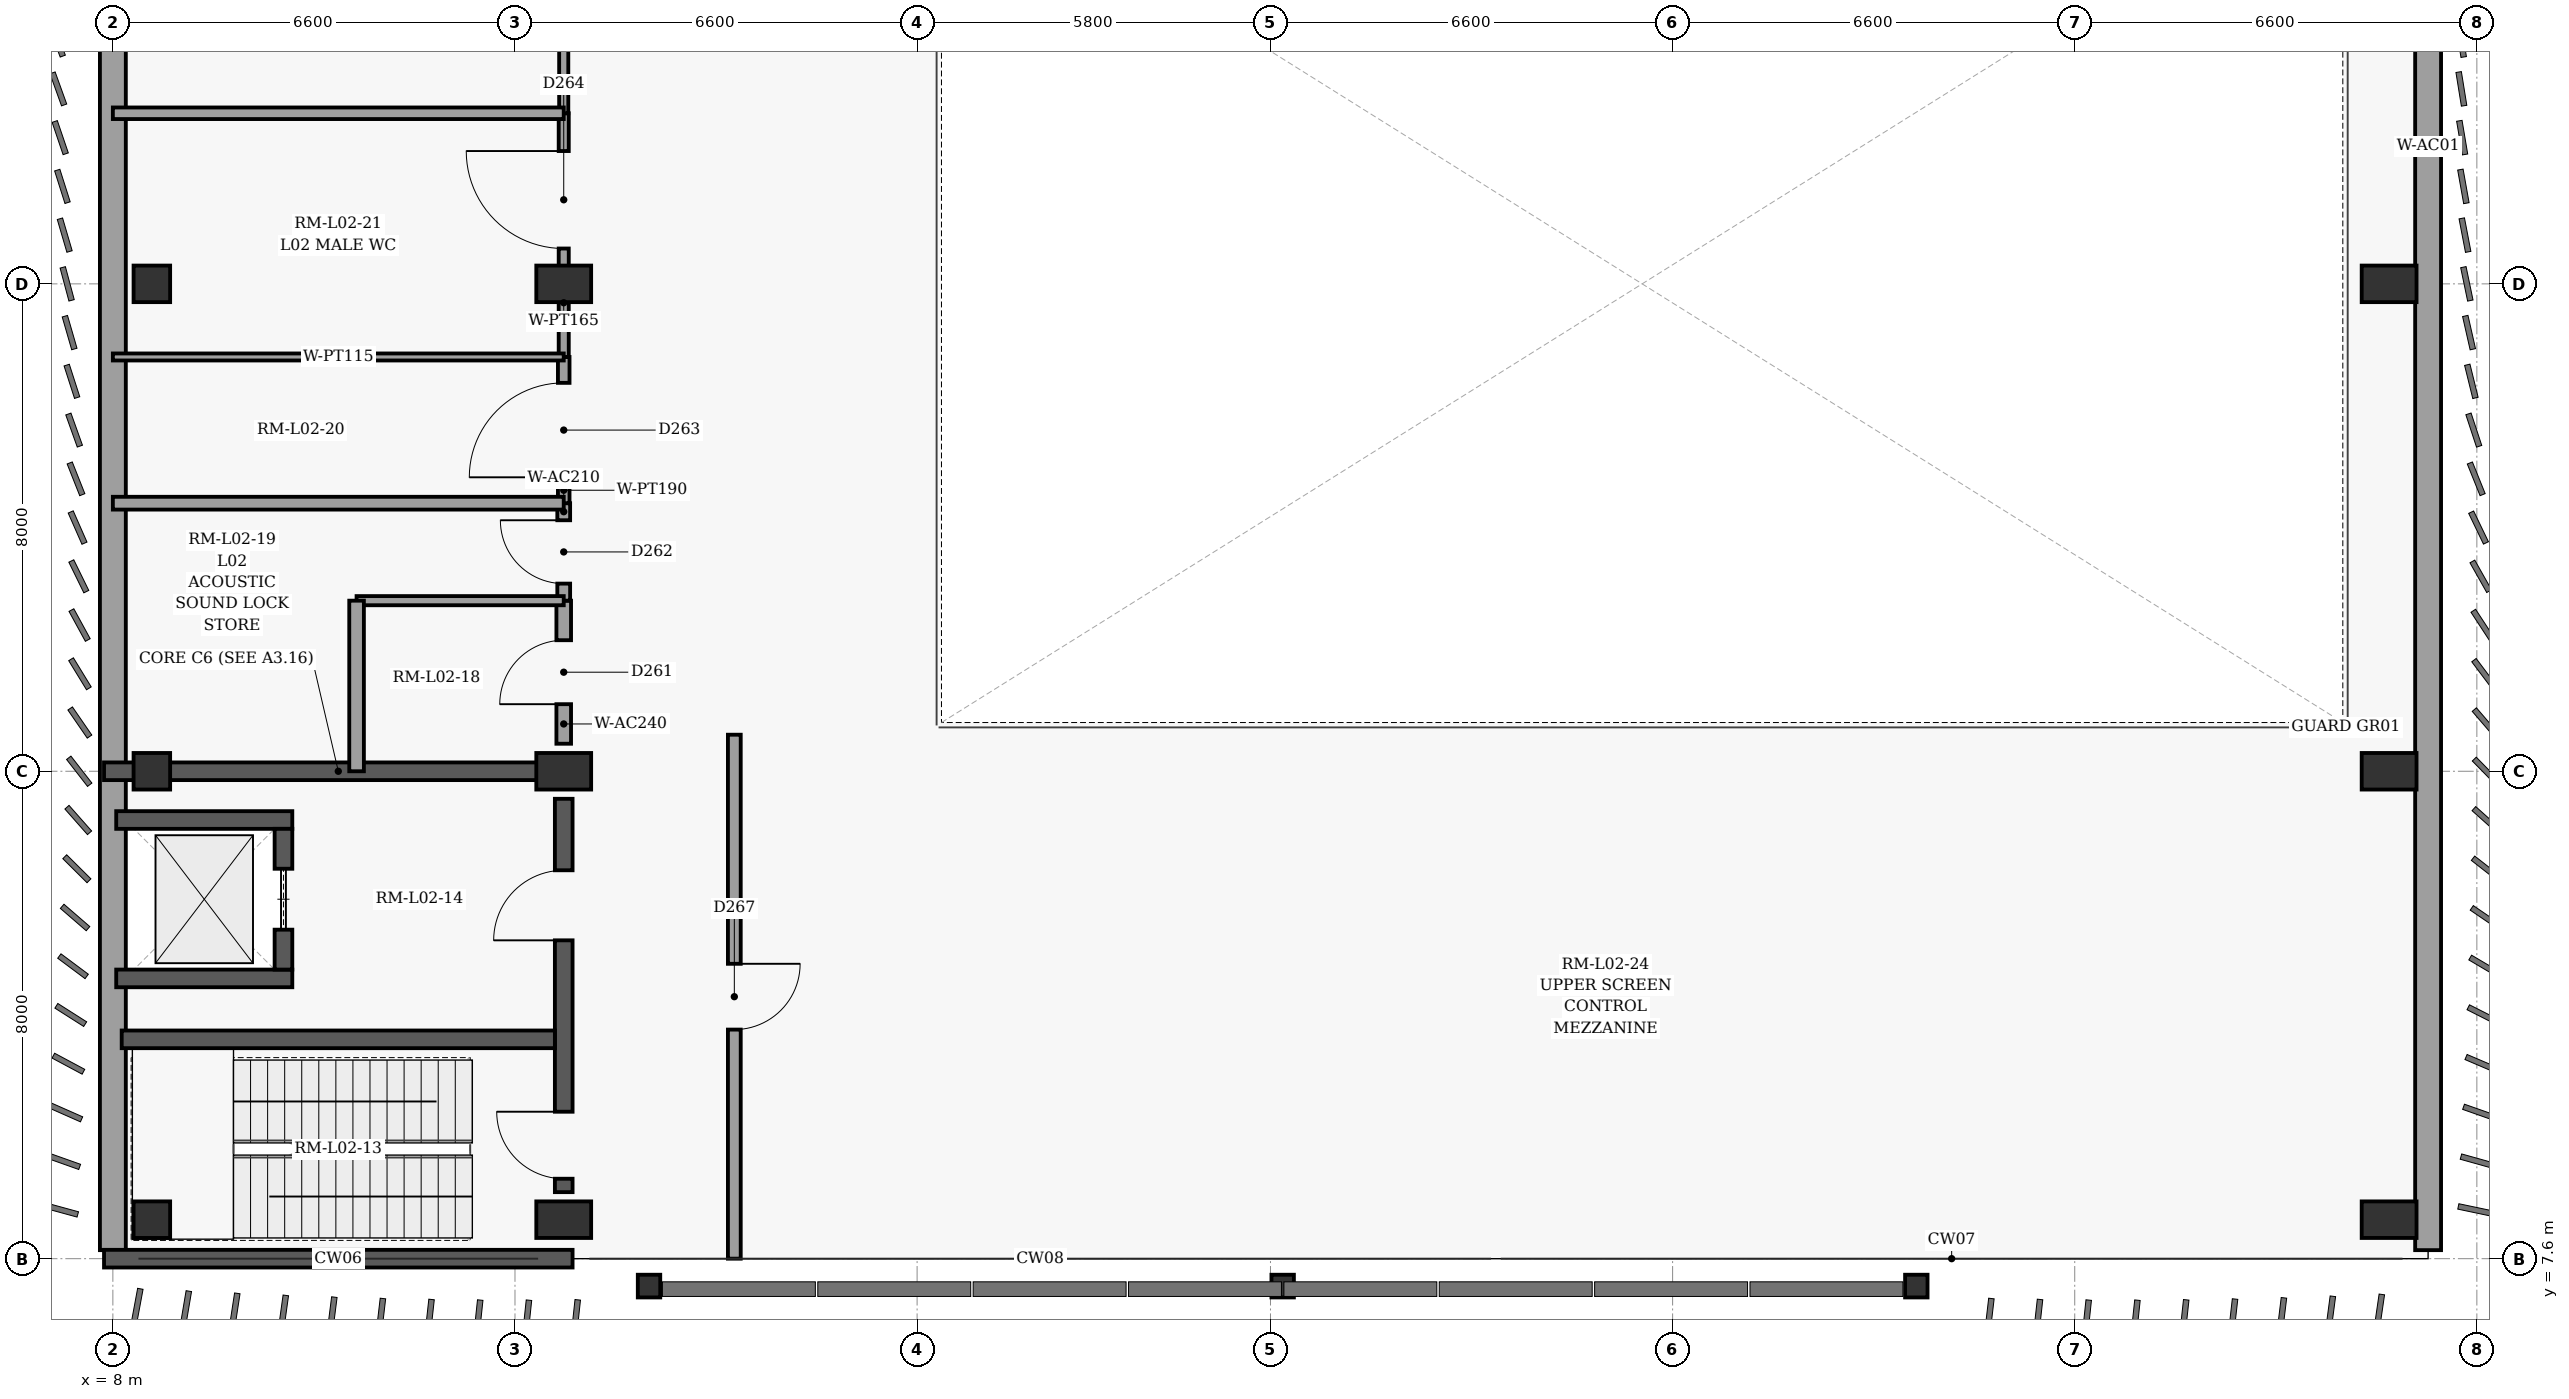
"""IFC4 building model, lengths in metres.
Left out: names, types, materials, properties, quantities, classifications, styles, units other than length and angle.
Written with IfcOpenShell. Run it as: python <this file> out.ifc"""

import sys

from ifc_helpers import new_model, si_unit, direction, frame, frame_2d, origin, origin_2d, place, context, subcontext, project, spatial, rectangle, i_section, extrude, element, fill, save


model = new_model("IFC4")
c1 = context("Model", 3, precision=1e-05, world=origin(), true_north=direction((0.0, 1.0)))
c2 = subcontext(c1, "Body", "Model", "MODEL_VIEW")
j1 = project(units=[si_unit("LENGTHUNIT", "METRE"), si_unit("PLANEANGLEUNIT", "RADIAN")], contexts=[c1])
p1 = place(None, origin())
s1 = spatial("IfcSite", under=j1, at=p1, CompositionType="ELEMENT")
p2 = place(p1, origin())
s2 = spatial("IfcBuilding", under=s1, at=p2, CompositionType="ELEMENT")
p3 = place(p2, frame((0.0, 0.0, 10.2)))
s3 = spatial("IfcBuildingStorey", under=s2, at=p3, CompositionType="ELEMENT", Elevation=10.2)
for number, where, z_axis, x_axis in (
    (1, (8.64, 8.24, 0.0), (0.0, 0.0, 1.0), (1.0, 0.0, 0.0)),
    (2, (8.64, 15.6, 0.0), (0.0, 0.0, 1.0), (1.0, 0.0, 0.0)),
    (3, (8.64, 23.6, 0.0), (0.0, 0.0, 1.0), (1.0, 0.0, 0.0)),
):
    element("IfcColumn", number, at=place(p3, frame(where, z_axis=z_axis, x_axis=x_axis)), inside=s3, PredefinedType="COLUMN", context=c2, shape_type="SweptSolid", body=[
        extrude(rectangle(XDim=0.6, YDim=0.6, at=origin_2d()), origin(), (0.0, 0.0, 1.0), 5.4),
    ])
for number, where, z_axis, x_axis in (
    (4, (15.4, 8.24, 0.0), (0.0, 0.0, 1.0), (1.0, 0.0, 0.0)),
    (5, (15.4, 15.6, 0.0), (0.0, 0.0, 1.0), (1.0, 0.0, 0.0)),
    (6, (15.4, 23.6, 0.0), (0.0, 0.0, 1.0), (1.0, 0.0, 0.0)),
    (7, (45.36, 8.24, 0.0), (0.0, 0.0, 1.0), (1.0, 0.0, 0.0)),
    (8, (45.36, 15.6, 0.0), (0.0, 0.0, 1.0), (1.0, 0.0, 0.0)),
    (9, (45.36, 23.6, 0.0), (0.0, 0.0, 1.0), (1.0, 0.0, 0.0)),
):
    element("IfcColumn", number, at=place(p3, frame(where, z_axis=z_axis, x_axis=x_axis)), inside=s3, PredefinedType="COLUMN", context=c2, shape_type="SweptSolid", body=[
        extrude(rectangle(XDim=0.6, YDim=0.9, at=origin_2d()), origin(), (0.0, 0.0, 1.0), 5.4),
    ])
for number, where, z_axis, x_axis in (
    (10, (16.8, 7.15, 0.0), (0.0, 0.0, 1.0), (1.0, 0.0, 0.0)),
    (11, (27.2, 7.15, 0.0), (0.0, 0.0, 1.0), (1.0, 0.0, 0.0)),
    (12, (37.6, 7.15, 0.0), (0.0, 0.0, 1.0), (1.0, 0.0, 0.0)),
):
    element("IfcColumn", number, at=place(p3, frame(where, z_axis=z_axis, x_axis=x_axis)), inside=s3, PredefinedType="COLUMN", context=c2, shape_type="SweptSolid", body=[
        extrude(i_section(OverallWidth=0.373, OverallDepth=0.368, WebThickness=0.014, FlangeThickness=0.024, at=origin_2d()), origin(), (0.0, 0.0, 1.0), 5.4),
    ])
for number, where, z_axis, x_axis in (
    (13, (46.0, 63.46, 0.0), (0.0, 0.0, 1.0), (0.0, -1.0, 0.0)),
    (14, (8.0, 7.74, 0.0), (0.0, 0.0, 1.0), (0.0, 1.0, 0.0)),
):
    element("IfcWall", number, at=place(p3, frame(where, z_axis=z_axis, x_axis=x_axis)), inside=s3, PredefinedType="SOLIDWALL", context=c2, shape_type="SweptSolid", body=[
        extrude(rectangle(XDim=55.72, YDim=0.425, at=frame_2d((27.86, 0.0))), origin(), (0.0, 0.0, 1.0), 5.16),
    ])
p4 = place(p3, frame((7.855, 7.6, 0.0), z_axis=(0.0, 0.0, 1.0), x_axis=(1.0, 0.0, 0.0)))
e15 = element("IfcWall", 15, at=p4, inside=s3, PredefinedType="SHEAR", context=c2, shape_type="SweptSolid", body=[
    extrude(rectangle(XDim=7.69, YDim=0.29, at=frame_2d((3.845, 0.0))), origin(), (0.0, 0.0, 1.0), 5.16),
])
p5 = place(p3, frame((7.855, 15.6, 0.0), z_axis=(0.0, 0.0, 1.0), x_axis=(1.0, 0.0, 0.0)))
e16 = element("IfcWall", 16, at=p5, inside=s3, PredefinedType="SHEAR", context=c2, shape_type="SweptSolid", body=[
    extrude(rectangle(XDim=7.243, YDim=0.29, at=frame_2d((3.622, 0.0))), origin(), (0.0, 0.0, 1.0), 5.16),
])
p6 = place(p3, frame((15.4, 8.692, 0.0), z_axis=(0.0, 0.0, 1.0), x_axis=(0.0, 1.0, 0.0)))
e17 = element("IfcWall", 17, at=p6, inside=s3, PredefinedType="SHEAR", context=c2, shape_type="SweptSolid", body=[
    extrude(rectangle(XDim=6.456, YDim=0.29, at=frame_2d((3.228, 0.0))), origin(), (0.0, 0.0, 1.0), 5.16),
])
p7 = place(p6, frame((0.22, 0.0, 0.0)))
e18 = element("IfcOpeningElement", 18, at=p7, cuts=e17, PredefinedType="OPENING", context=c2, shape_type="SweptSolid", body=[
    extrude(rectangle(XDim=1.1, YDim=2.15, at=frame_2d((0.55, 1.075))), frame((0.0, 0.155, 0.0), z_axis=(0.0, -1.0, 0.0), x_axis=(1.0, 0.0, 0.0)), (0.0, 0.0, 1.0), 0.31),
])
p8 = place(p6, frame((4.133, 0.0, 0.0)))
e19 = element("IfcOpeningElement", 19, at=p8, cuts=e17, PredefinedType="OPENING", context=c2, shape_type="SweptSolid", body=[
    extrude(rectangle(XDim=1.15, YDim=2.2, at=frame_2d((0.575, 1.1))), frame((0.0, 0.155, 0.0), z_axis=(0.0, -1.0, 0.0), x_axis=(1.0, 0.0, 0.0)), (0.0, 0.0, 1.0), 0.31),
])
p9 = place(p3, frame((8.145, 11.2, 0.0), z_axis=(0.0, 0.0, 1.0), x_axis=(1.0, 0.0, 0.0)))
e20 = element("IfcWall", 20, at=p9, inside=s3, PredefinedType="SHEAR", context=c2, shape_type="SweptSolid", body=[
    extrude(rectangle(XDim=7.11, YDim=0.29, at=frame_2d((3.555, 0.0))), origin(), (0.0, 0.0, 1.0), 5.16),
])
for number, where, z_axis, x_axis in (
    (21, (8.055, 12.2, 0.0), (0.0, 0.0, 1.0), (1.0, 0.0, 0.0)),
    (22, (8.055, 14.8, 0.0), (0.0, 0.0, 1.0), (1.0, 0.0, 0.0)),
):
    element("IfcWall", number, at=place(p3, frame(where, z_axis=z_axis, x_axis=x_axis)), inside=s3, PredefinedType="SHEAR", context=c2, shape_type="SweptSolid", body=[
        extrude(rectangle(XDim=2.89, YDim=0.29, at=frame_2d((1.445, 0.0))), origin(), (0.0, 0.0, 1.0), 5.16),
    ])
p10 = place(p3, frame((10.8, 12.345, 0.0), z_axis=(0.0, 0.0, 1.0), x_axis=(0.0, 1.0, 0.0)))
e23 = element("IfcWall", 23, at=p10, inside=s3, PredefinedType="SHEAR", context=c2, shape_type="SweptSolid", body=[
    extrude(rectangle(XDim=2.31, YDim=0.29, at=frame_2d((1.155, 0.0))), origin(), (0.0, 0.0, 1.0), 5.16),
])
p11 = place(p10, frame((0.655, 0.0, 0.0)))
e24 = element("IfcOpeningElement", 24, at=p11, cuts=e23, PredefinedType="OPENING", context=c2, shape_type="SweptSolid", body=[
    extrude(rectangle(XDim=1.0, YDim=2.15, at=frame_2d((0.5, 1.075))), frame((0.0, 0.155, 0.0), z_axis=(0.0, -1.0, 0.0), x_axis=(1.0, 0.0, 0.0)), (0.0, 0.0, 1.0), 0.31),
])
p12 = place(p3, frame((15.4, 16.052, 0.0), z_axis=(0.0, 0.0, 1.0), x_axis=(0.0, 1.0, 0.0)))
e25 = element("IfcWall", 25, at=p12, inside=s3, PredefinedType="PARTITIONING", context=c2, shape_type="SweptSolid", body=[
    extrude(rectangle(XDim=2.348, YDim=0.24, at=frame_2d((1.174, 0.0))), origin(), (0.0, 0.0, 1.0), 4.31),
])
p13 = place(p12, frame((0.649, 0.0, 0.0)))
e26 = element("IfcOpeningElement", 26, at=p13, cuts=e25, PredefinedType="OPENING", context=c2, shape_type="SweptSolid", body=[
    extrude(rectangle(XDim=1.05, YDim=2.15, at=frame_2d((0.525, 1.075))), frame((0.0, 0.13, 0.0), z_axis=(0.0, -1.0, 0.0), x_axis=(1.0, 0.0, 0.0)), (0.0, 0.0, 1.0), 0.26),
])
p14 = place(p3, frame((15.4, 18.4, 0.0), z_axis=(0.0, 0.0, 1.0), x_axis=(0.0, 1.0, 0.0)))
e27 = element("IfcWall", 27, at=p14, inside=s3, PredefinedType="PARTITIONING", context=c2, shape_type="SweptSolid", body=[
    extrude(rectangle(XDim=1.6, YDim=0.21, at=frame_2d((0.8, 0.0))), origin(), (0.0, 0.0, 1.0), 4.31),
])
p15 = place(p14, frame((0.28, 0.0, 0.0)))
e28 = element("IfcOpeningElement", 28, at=p15, cuts=e27, PredefinedType="OPENING", context=c2, shape_type="SweptSolid", body=[
    extrude(rectangle(XDim=1.04, YDim=2.2, at=frame_2d((0.52, 1.1))), frame((0.0, 0.115, 0.0), z_axis=(0.0, -1.0, 0.0), x_axis=(1.0, 0.0, 0.0)), (0.0, 0.0, 1.0), 0.23),
])
p16 = place(p3, frame((15.4, 20.0, 0.0), z_axis=(0.0, 0.0, 1.0), x_axis=(0.0, 1.0, 0.0)))
e29 = element("IfcWall", 29, at=p16, inside=s3, PredefinedType="PARTITIONING", context=c2, shape_type="SweptSolid", body=[
    extrude(rectangle(XDim=2.4, YDim=0.19, at=frame_2d((1.2, 0.0))), origin(), (0.0, 0.0, 1.0), 4.31),
])
p17 = place(p16, frame((0.425, 0.0, 0.0)))
e30 = element("IfcOpeningElement", 30, at=p17, cuts=e29, PredefinedType="OPENING", context=c2, shape_type="SweptSolid", body=[
    extrude(rectangle(XDim=1.55, YDim=2.25, at=frame_2d((0.775, 1.125))), frame((0.0, 0.105, 0.0), z_axis=(0.0, -1.0, 0.0), x_axis=(1.0, 0.0, 0.0)), (0.0, 0.0, 1.0), 0.21),
])
p18 = place(p3, frame((15.4, 22.4, 0.0), z_axis=(0.0, 0.0, 1.0), x_axis=(0.0, 1.0, 0.0)))
e31 = element("IfcWall", 31, at=p18, inside=s3, PredefinedType="PARTITIONING", context=c2, shape_type="SweptSolid", body=[
    extrude(rectangle(XDim=4.0, YDim=0.165, at=frame_2d((2.0, 0.0))), origin(), (0.0, 0.0, 1.0), 4.31),
])
p19 = place(p18, frame((1.78, 0.0, 0.0)))
e32 = element("IfcOpeningElement", 32, at=p19, cuts=e31, PredefinedType="OPENING", context=c2, shape_type="SweptSolid", body=[
    extrude(rectangle(XDim=1.6, YDim=2.3, at=frame_2d((0.8, 1.15))), frame((0.0, 0.093, 0.0), z_axis=(0.0, -1.0, 0.0), x_axis=(1.0, 0.0, 0.0)), (0.0, 0.0, 1.0), 0.185),
])
p20 = place(p3, frame((15.4, 26.4, 0.0), z_axis=(0.0, 0.0, 1.0), x_axis=(0.0, 1.0, 0.0)))
e33 = element("IfcWall", 33, at=p20, inside=s3, PredefinedType="PARTITIONING", context=c2, shape_type="SweptSolid", body=[
    extrude(rectangle(XDim=17.6, YDim=0.15, at=frame_2d((8.8, 0.0))), origin(), (0.0, 0.0, 1.0), 4.31),
])
p21 = place(p20, frame((8.31, 0.0, 0.0)))
e34 = element("IfcOpeningElement", 34, at=p21, cuts=e33, PredefinedType="OPENING", context=c2, shape_type="SweptSolid", body=[
    extrude(rectangle(XDim=0.98, YDim=2.1, at=frame_2d((0.49, 1.05))), frame((0.0, 0.085, 0.0), z_axis=(0.0, -1.0, 0.0), x_axis=(1.0, 0.0, 0.0)), (0.0, 0.0, 1.0), 0.17),
])
p22 = place(p3, frame((18.2, 16.2, 0.0), z_axis=(0.0, 0.0, 1.0), x_axis=(0.0, -1.0, 0.0)))
e35 = element("IfcWall", 35, at=p22, inside=s3, PredefinedType="PARTITIONING", context=c2, shape_type="SweptSolid", body=[
    extrude(rectangle(XDim=8.6, YDim=0.21, at=frame_2d((4.3, 0.0))), origin(), (0.0, 0.0, 1.0), 5.16),
])
p23 = place(p22, frame((3.76, 0.0, 0.0)))
e36 = element("IfcOpeningElement", 36, at=p23, cuts=e35, PredefinedType="OPENING", context=c2, shape_type="SweptSolid", body=[
    extrude(rectangle(XDim=1.08, YDim=2.15, at=frame_2d((0.54, 1.075))), frame((0.0, 0.115, 0.0), z_axis=(0.0, -1.0, 0.0), x_axis=(1.0, 0.0, 0.0)), (0.0, 0.0, 1.0), 0.23),
])
p24 = place(p3, frame((12.0, 18.4, 0.0), z_axis=(0.0, 0.0, 1.0), x_axis=(1.0, 0.0, 0.0)))
e37 = element("IfcWall", 37, at=p24, inside=s3, PredefinedType="PARTITIONING", context=c2, shape_type="SweptSolid", body=[
    extrude(rectangle(XDim=3.4, YDim=0.15, at=frame_2d((1.7, 0.0))), origin(), (0.0, 0.0, 1.0), 5.16),
])
p25 = place(p3, frame((12.0, 15.6, 0.0), z_axis=(0.0, 0.0, 1.0), x_axis=(0.0, 1.0, 0.0)))
e38 = element("IfcWall", 38, at=p25, inside=s3, PredefinedType="PARTITIONING", context=c2, shape_type="SweptSolid", body=[
    extrude(rectangle(XDim=2.8, YDim=0.24, at=frame_2d((1.4, 0.0))), origin(), (0.0, 0.0, 1.0), 5.16),
])
p26 = place(p3, frame((8.0, 20.0, 0.0), z_axis=(0.0, 0.0, 1.0), x_axis=(1.0, 0.0, 0.0)))
e39 = element("IfcWall", 39, at=p26, inside=s3, PredefinedType="PARTITIONING", context=c2, shape_type="SweptSolid", body=[
    extrude(rectangle(XDim=7.4, YDim=0.21, at=frame_2d((3.7, 0.0))), origin(), (0.0, 0.0, 1.0), 5.16),
])
p27 = place(p3, frame((8.0, 22.4, 0.0), z_axis=(0.0, 0.0, 1.0), x_axis=(1.0, 0.0, 0.0)))
e40 = element("IfcWall", 40, at=p27, inside=s3, PredefinedType="PARTITIONING", context=c2, shape_type="SweptSolid", body=[
    extrude(rectangle(XDim=7.4, YDim=0.115, at=frame_2d((3.7, 0.0))), origin(), (0.0, 0.0, 1.0), 5.16),
])
p28 = place(p3, frame((8.0, 26.4, 0.0), z_axis=(0.0, 0.0, 1.0), x_axis=(1.0, 0.0, 0.0)))
e41 = element("IfcWall", 41, at=p28, inside=s3, PredefinedType="PARTITIONING", context=c2, shape_type="SweptSolid", body=[
    extrude(rectangle(XDim=7.4, YDim=0.19, at=frame_2d((3.7, 0.0))), origin(), (0.0, 0.0, 1.0), 5.16),
])
p29 = place(p7, origin())
e42 = element("IfcDoor", 42, at=p29, inside=s3, OperationType="SINGLE_SWING_RIGHT", PredefinedType="DOOR", context=c2, shape_type="SweptSolid", body=[
    extrude(rectangle(XDim=1.1, YDim=2.15, at=frame_2d((0.55, 1.075))), frame((0.0, 0.025, 0.0), z_axis=(0.0, -1.0, 0.0), x_axis=(1.0, 0.0, 0.0)), (0.0, 0.0, 1.0), 0.05),
])
fill(e18, e42)
p30 = place(p8, origin())
e43 = element("IfcDoor", 43, at=p30, inside=s3, OperationType="SINGLE_SWING_LEFT", PredefinedType="DOOR", context=c2, shape_type="SweptSolid", body=[
    extrude(rectangle(XDim=1.15, YDim=2.2, at=frame_2d((0.575, 1.1))), frame((0.0, 0.025, 0.0), z_axis=(0.0, -1.0, 0.0), x_axis=(1.0, 0.0, 0.0)), (0.0, 0.0, 1.0), 0.05),
])
fill(e19, e43)
p31 = place(p11, origin())
e44 = element("IfcDoor", 44, at=p31, inside=s3, OperationType="SLIDING_TO_LEFT", PredefinedType="DOOR", context=c2, shape_type="SweptSolid", body=[
    extrude(rectangle(XDim=1.0, YDim=2.15, at=frame_2d((0.5, 1.075))), frame((0.0, 0.025, 0.0), z_axis=(0.0, -1.0, 0.0), x_axis=(1.0, 0.0, 0.0)), (0.0, 0.0, 1.0), 0.05),
])
fill(e24, e44)
p32 = place(p13, origin())
e45 = element("IfcDoor", 45, at=p32, inside=s3, OperationType="SINGLE_SWING_LEFT", PredefinedType="DOOR", context=c2, shape_type="SweptSolid", body=[
    extrude(rectangle(XDim=1.05, YDim=2.15, at=frame_2d((0.525, 1.075))), frame((0.0, 0.025, 0.0), z_axis=(0.0, -1.0, 0.0), x_axis=(1.0, 0.0, 0.0)), (0.0, 0.0, 1.0), 0.05),
])
fill(e26, e45)
p33 = place(p15, origin())
e46 = element("IfcDoor", 46, at=p33, inside=s3, OperationType="SINGLE_SWING_RIGHT", PredefinedType="DOOR", context=c2, shape_type="SweptSolid", body=[
    extrude(rectangle(XDim=1.04, YDim=2.2, at=frame_2d((0.52, 1.1))), frame((0.0, 0.025, 0.0), z_axis=(0.0, -1.0, 0.0), x_axis=(1.0, 0.0, 0.0)), (0.0, 0.0, 1.0), 0.05),
])
fill(e28, e46)
p34 = place(p17, origin())
e47 = element("IfcDoor", 47, at=p34, inside=s3, OperationType="SINGLE_SWING_LEFT", PredefinedType="DOOR", context=c2, shape_type="SweptSolid", body=[
    extrude(rectangle(XDim=1.55, YDim=2.25, at=frame_2d((0.775, 1.125))), frame((0.0, 0.025, 0.0), z_axis=(0.0, -1.0, 0.0), x_axis=(1.0, 0.0, 0.0)), (0.0, 0.0, 1.0), 0.05),
])
fill(e30, e47)
p35 = place(p19, origin())
e48 = element("IfcDoor", 48, at=p35, inside=s3, OperationType="SINGLE_SWING_RIGHT", PredefinedType="DOOR", context=c2, shape_type="SweptSolid", body=[
    extrude(rectangle(XDim=1.6, YDim=2.3, at=frame_2d((0.8, 1.15))), frame((0.0, 0.025, 0.0), z_axis=(0.0, -1.0, 0.0), x_axis=(1.0, 0.0, 0.0)), (0.0, 0.0, 1.0), 0.05),
])
fill(e32, e48)
p36 = place(p23, origin())
e49 = element("IfcDoor", 49, at=p36, inside=s3, OperationType="SINGLE_SWING_LEFT", PredefinedType="DOOR", context=c2, shape_type="SweptSolid", body=[
    extrude(rectangle(XDim=1.08, YDim=2.15, at=frame_2d((0.54, 1.075))), frame((0.0, 0.025, 0.0), z_axis=(0.0, -1.0, 0.0), x_axis=(1.0, 0.0, 0.0)), (0.0, 0.0, 1.0), 0.05),
])
fill(e36, e49)
save(model, sys.argv[1])
